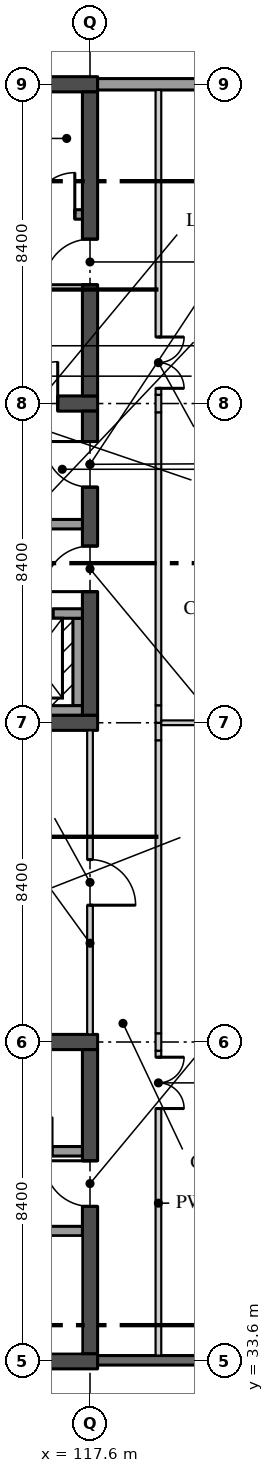
"""IFC4 building model, lengths in metres.
Left out: names, types, materials, properties, quantities, classifications, styles, units other than length and angle.
Written with IfcOpenShell. Run it as: python <this file> out.ifc"""

import sys

from ifc_helpers import new_model, si_unit, direction, frame, frame_2d, origin, place, context, subcontext, project, spatial, rectangle, extrude, element, fill, save


model = new_model("IFC4")
c1 = context("Model", 3, precision=1e-05, world=origin(), true_north=direction((0.0, 1.0)))
c2 = subcontext(c1, "Body", "Model", "MODEL_VIEW")
j1 = project(units=[si_unit("LENGTHUNIT", "METRE"), si_unit("PLANEANGLEUNIT", "RADIAN")], contexts=[c1])
p1 = place(None, origin())
s1 = spatial("IfcSite", under=j1, at=p1, CompositionType="ELEMENT")
p2 = place(p1, origin())
s2 = spatial("IfcBuilding", under=s1, at=p2, CompositionType="ELEMENT")
p3 = place(p2, frame((0.0, 0.0, 14.4)))
s3 = spatial("IfcBuildingStorey", under=s2, at=p3, CompositionType="ELEMENT", Elevation=14.4)
p4 = place(p3, frame((109.0, 50.4, 0.0), z_axis=(0.0, 0.0, 1.0), x_axis=(1.0, 0.0, 0.0)))
e1 = element("IfcWall", 1, at=p4, inside=s3, PredefinedType="SHEAR", context=c2, shape_type="SweptSolid", body=[
    extrude(rectangle(XDim=8.8, YDim=0.4, at=frame_2d((4.4, 0.0))), origin(), (0.0, 0.0, 1.0), 4.37),
])
p5 = place(p3, frame((109.0, 58.8, 0.0), z_axis=(0.0, 0.0, 1.0), x_axis=(1.0, 0.0, 0.0)))
e2 = element("IfcWall", 2, at=p5, inside=s3, PredefinedType="SHEAR", context=c2, shape_type="SweptSolid", body=[
    extrude(rectangle(XDim=8.8, YDim=0.4, at=frame_2d((4.4, 0.0))), origin(), (0.0, 0.0, 1.0), 4.37),
])
p6 = place(p5, frame((6.65, 0.0, 0.0)))
e3 = element("IfcOpeningElement", 3, at=p6, cuts=e2, PredefinedType="OPENING", context=c2, shape_type="SweptSolid", body=[
    extrude(rectangle(XDim=1.1, YDim=2.1, at=frame_2d((0.55, 1.05))), frame((0.0, 0.21, 0.0), z_axis=(0.0, -1.0, 0.0), x_axis=(1.0, 0.0, 0.0)), (0.0, 0.0, 1.0), 0.42),
])
p7 = place(p3, frame((117.6, 50.6, 0.0), z_axis=(0.0, 0.0, 1.0), x_axis=(0.0, 1.0, 0.0)))
e4 = element("IfcWall", 4, at=p7, inside=s3, PredefinedType="SHEAR", context=c2, shape_type="SweptSolid", body=[
    extrude(rectangle(XDim=8.0, YDim=0.4, at=frame_2d((4.0, 0.0))), origin(), (0.0, 0.0, 1.0), 4.37),
])
p8 = place(p7, frame((3.25, 0.0, 0.0)))
e5 = element("IfcOpeningElement", 5, at=p8, cuts=e4, PredefinedType="OPENING", context=c2, shape_type="SweptSolid", body=[
    extrude(rectangle(XDim=1.2, YDim=2.1, at=frame_2d((0.6, 1.05))), frame((0.0, 0.21, 0.0), z_axis=(0.0, -1.0, 0.0), x_axis=(1.0, 0.0, 0.0)), (0.0, 0.0, 1.0), 0.42),
])
p9 = place(p7, frame((6.0, 0.0, 0.0)))
e6 = element("IfcOpeningElement", 6, at=p9, cuts=e4, PredefinedType="OPENING", context=c2, shape_type="SweptSolid", body=[
    extrude(rectangle(XDim=1.2, YDim=2.1, at=frame_2d((0.6, 1.05))), frame((0.0, 0.21, 0.0), z_axis=(0.0, -1.0, 0.0), x_axis=(1.0, 0.0, 0.0)), (0.0, 0.0, 1.0), 0.42),
])
p10 = place(p3, frame((114.75, 55.625, 0.0), z_axis=(0.0, 0.0, 1.0), x_axis=(1.0, 0.0, 0.0)))
e7 = element("IfcWall", 7, at=p10, inside=s3, PredefinedType="SOLIDWALL", context=c2, shape_type="SweptSolid", body=[
    extrude(rectangle(XDim=2.65, YDim=0.25, at=frame_2d((1.325, 0.0))), origin(), (0.0, 0.0, 1.0), 4.37),
])
p11 = place(p3, frame((109.0, 67.2, 0.0), z_axis=(0.0, 0.0, 1.0), x_axis=(1.0, 0.0, 0.0)))
e8 = element("IfcWall", 8, at=p11, inside=s3, PredefinedType="SHEAR", context=c2, shape_type="SweptSolid", body=[
    extrude(rectangle(XDim=8.8, YDim=0.4, at=frame_2d((4.4, 0.0))), origin(), (0.0, 0.0, 1.0), 4.37),
])
p12 = place(p3, frame((117.6, 59.0, 0.0), z_axis=(0.0, 0.0, 1.0), x_axis=(0.0, 1.0, 0.0)))
e9 = element("IfcWall", 9, at=p12, inside=s3, PredefinedType="SHEAR", context=c2, shape_type="SweptSolid", body=[
    extrude(rectangle(XDim=8.0, YDim=0.4, at=frame_2d((4.0, 0.0))), origin(), (0.0, 0.0, 1.0), 4.37),
])
p13 = place(p12, frame((2.925, 0.0, 0.0)))
e10 = element("IfcOpeningElement", 10, at=p13, cuts=e9, PredefinedType="OPENING", context=c2, shape_type="SweptSolid", body=[
    extrude(rectangle(XDim=1.2, YDim=2.1, at=frame_2d((0.6, 1.05))), frame((0.0, 0.21, 0.0), z_axis=(0.0, -1.0, 0.0), x_axis=(1.0, 0.0, 0.0)), (0.0, 0.0, 1.0), 0.42),
])
p14 = place(p3, frame((117.4, 63.775, 0.0), z_axis=(0.0, 0.0, 1.0), x_axis=(-1.0, 0.0, 0.0)))
e11 = element("IfcWall", 11, at=p14, inside=s3, PredefinedType="SOLIDWALL", context=c2, shape_type="SweptSolid", body=[
    extrude(rectangle(XDim=8.0, YDim=0.25, at=frame_2d((4.0, 0.0))), origin(), (0.0, 0.0, 1.0), 4.37),
])
p15 = place(p14, frame((0.2, 0.0, 0.0)))
e12 = element("IfcOpeningElement", 12, at=p15, cuts=e11, PredefinedType="OPENING", context=c2, shape_type="SweptSolid", body=[
    extrude(rectangle(XDim=1.1, YDim=2.1, at=frame_2d((0.55, 1.05))), frame((0.0, 0.135, 0.0), z_axis=(0.0, -1.0, 0.0), x_axis=(1.0, 0.0, 0.0)), (0.0, 0.0, 1.0), 0.27),
])
for number, where, z_axis, x_axis in (
    (13, (109.0, 33.6, 0.0), (0.0, 0.0, 1.0), (1.0, 0.0, 0.0)),
    (14, (109.0, 42.0, 0.0), (0.0, 0.0, 1.0), (1.0, 0.0, 0.0)),
):
    element("IfcWall", number, at=place(p3, frame(where, z_axis=z_axis, x_axis=x_axis)), inside=s3, PredefinedType="SHEAR", context=c2, shape_type="SweptSolid", body=[
        extrude(rectangle(XDim=8.8, YDim=0.4, at=frame_2d((4.4, 0.0))), origin(), (0.0, 0.0, 1.0), 4.37),
    ])
p16 = place(p3, frame((117.6, 33.8, 0.0), z_axis=(0.0, 0.0, 1.0), x_axis=(0.0, 1.0, 0.0)))
e15 = element("IfcWall", 15, at=p16, inside=s3, PredefinedType="SHEAR", context=c2, shape_type="SweptSolid", body=[
    extrude(rectangle(XDim=8.0, YDim=0.4, at=frame_2d((4.0, 0.0))), origin(), (0.0, 0.0, 1.0), 4.37),
])
p17 = place(p16, frame((3.875, 0.0, 0.0)))
e16 = element("IfcOpeningElement", 16, at=p17, cuts=e15, PredefinedType="OPENING", context=c2, shape_type="SweptSolid", body=[
    extrude(rectangle(XDim=1.2, YDim=2.1, at=frame_2d((0.6, 1.05))), frame((0.0, 0.21, 0.0), z_axis=(0.0, -1.0, 0.0), x_axis=(1.0, 0.0, 0.0)), (0.0, 0.0, 1.0), 0.42),
])
p18 = place(p3, frame((109.4, 37.025, 0.0), z_axis=(0.0, 0.0, 1.0), x_axis=(1.0, 0.0, 0.0)))
e17 = element("IfcWall", 17, at=p18, inside=s3, PredefinedType="SOLIDWALL", context=c2, shape_type="SweptSolid", body=[
    extrude(rectangle(XDim=8.0, YDim=0.25, at=frame_2d((4.0, 0.0))), origin(), (0.0, 0.0, 1.0), 4.37),
])
p19 = place(p18, frame((0.2, 0.0, 0.0)))
e18 = element("IfcOpeningElement", 18, at=p19, cuts=e17, PredefinedType="OPENING", context=c2, shape_type="SweptSolid", body=[
    extrude(rectangle(XDim=1.1, YDim=2.1, at=frame_2d((0.55, 1.05))), frame((0.0, 0.135, 0.0), z_axis=(0.0, -1.0, 0.0), x_axis=(1.0, 0.0, 0.0)), (0.0, 0.0, 1.0), 0.27),
])
p20 = place(p3, frame((112.05, 39.125, 0.0), z_axis=(0.0, 0.0, 1.0), x_axis=(1.0, 0.0, 0.0)))
e19 = element("IfcWall", 19, at=p20, inside=s3, PredefinedType="SOLIDWALL", context=c2, shape_type="SweptSolid", body=[
    extrude(rectangle(XDim=5.35, YDim=0.25, at=frame_2d((2.675, 0.0))), origin(), (0.0, 0.0, 1.0), 4.37),
])
p21 = place(p20, frame((3.65, 0.0, 0.0)))
e20 = element("IfcOpeningElement", 20, at=p21, cuts=e19, PredefinedType="OPENING", context=c2, shape_type="SweptSolid", body=[
    extrude(rectangle(XDim=0.9, YDim=2.1, at=frame_2d((0.45, 1.05))), frame((0.0, 0.135, 0.0), z_axis=(0.0, -1.0, 0.0), x_axis=(1.0, 0.0, 0.0)), (0.0, 0.0, 1.0), 0.27),
])
p22 = place(p20, frame((0.9, 0.0, 0.0)))
e21 = element("IfcOpeningElement", 21, at=p22, cuts=e19, PredefinedType="OPENING", context=c2, shape_type="SweptSolid", body=[
    extrude(rectangle(XDim=0.8, YDim=2.1, at=frame_2d((0.4, 1.05))), frame((0.0, 0.135, 0.0), z_axis=(0.0, -1.0, 0.0), x_axis=(1.0, 0.0, 0.0)), (0.0, 0.0, 1.0), 0.27),
])
p23 = place(p3, frame((117.275, 50.85, 0.0), z_axis=(0.0, 0.0, 1.0), x_axis=(0.0, 1.0, 0.0)))
e22 = element("IfcWall", 22, at=p23, inside=s3, PredefinedType="SOLIDWALL", context=c2, shape_type="SweptSolid", body=[
    extrude(rectangle(XDim=2.3, YDim=0.25, at=frame_2d((1.15, 0.0))), origin(), (0.0, 0.0, 1.0), 4.37),
])
p24 = place(p3, frame((114.75, 53.275, 0.0), z_axis=(0.0, 0.0, 1.0), x_axis=(1.0, 0.0, 0.0)))
e23 = element("IfcWall", 23, at=p24, inside=s3, PredefinedType="SOLIDWALL", context=c2, shape_type="SweptSolid", body=[
    extrude(rectangle(XDim=2.65, YDim=0.25, at=frame_2d((1.325, 0.0))), origin(), (0.0, 0.0, 1.0), 4.37),
])
p25 = place(p24, frame((0.775, 0.0, 0.0)))
e24 = element("IfcOpeningElement", 24, at=p25, cuts=e23, PredefinedType="OPENING", context=c2, shape_type="SweptSolid", body=[
    extrude(rectangle(XDim=1.1, YDim=2.1, at=frame_2d((0.55, 1.05))), frame((0.0, 0.135, 0.0), z_axis=(0.0, -1.0, 0.0), x_axis=(1.0, 0.0, 0.0)), (0.0, 0.0, 1.0), 0.27),
])
p26 = place(p3, frame((114.75, 50.725, 0.0), z_axis=(0.0, 0.0, 1.0), x_axis=(1.0, 0.0, 0.0)))
e25 = element("IfcWall", 25, at=p26, inside=s3, PredefinedType="SOLIDWALL", context=c2, shape_type="SweptSolid", body=[
    extrude(rectangle(XDim=2.65, YDim=0.25, at=frame_2d((1.325, 0.0))), origin(), (0.0, 0.0, 1.0), 4.37),
])
p27 = place(p3, frame((119.4, 33.75, 0.0), z_axis=(0.0, 0.0, 1.0), x_axis=(0.0, 1.0, 0.0)))
e26 = element("IfcWall", 26, at=p27, inside=s3, PredefinedType="PARTITIONING", context=c2, shape_type="SweptSolid", body=[
    extrude(rectangle(XDim=8.02, YDim=0.15, at=frame_2d((4.01, 0.0))), origin(), (0.0, 0.0, 1.0), 4.37),
])
p28 = place(p27, frame((6.5, 0.0, 0.0)))
e27 = element("IfcOpeningElement", 27, at=p28, cuts=e26, PredefinedType="OPENING", context=c2, shape_type="SweptSolid", body=[
    extrude(rectangle(XDim=1.35, YDim=2.1, at=frame_2d((0.675, 1.05))), frame((0.0, 0.085, 0.0), z_axis=(0.0, -1.0, 0.0), x_axis=(1.0, 0.0, 0.0)), (0.0, 0.0, 1.0), 0.17),
])
p29 = place(p3, frame((119.4, 41.77, 0.0), z_axis=(0.0, 0.0, 1.0), x_axis=(0.0, 1.0, 0.0)))
e28 = element("IfcWall", 28, at=p29, inside=s3, PredefinedType="PARTITIONING", context=c2, shape_type="SweptSolid", body=[
    extrude(rectangle(XDim=0.46, YDim=0.15, at=frame_2d((0.23, 0.0))), origin(), (0.0, 0.0, 1.0), 3.746),
])
p30 = place(p3, frame((119.4, 42.23, 0.0), z_axis=(0.0, 0.0, 1.0), x_axis=(0.0, 1.0, 0.0)))
e29 = element("IfcWall", 29, at=p30, inside=s3, PredefinedType="PARTITIONING", context=c2, shape_type="SweptSolid", body=[
    extrude(rectangle(XDim=7.71, YDim=0.15, at=frame_2d((3.855, 0.0))), origin(), (0.0, 0.0, 1.0), 4.37),
])
p31 = place(p3, frame((119.4, 49.94, 0.0), z_axis=(0.0, 0.0, 1.0), x_axis=(0.0, 1.0, 0.0)))
e30 = element("IfcWall", 30, at=p31, inside=s3, PredefinedType="PARTITIONING", context=c2, shape_type="SweptSolid", body=[
    extrude(rectangle(XDim=0.46, YDim=0.15, at=frame_2d((0.23, 0.0))), origin(), (0.0, 0.0, 1.0), 3.746),
])
p32 = place(p3, frame((119.4, 50.4, 0.0), z_axis=(0.0, 0.0, 1.0), x_axis=(0.0, 1.0, 0.0)))
e31 = element("IfcWall", 31, at=p32, inside=s3, PredefinedType="PARTITIONING", context=c2, shape_type="SweptSolid", body=[
    extrude(rectangle(XDim=0.46, YDim=0.15, at=frame_2d((0.23, 0.0))), origin(), (0.0, 0.0, 1.0), 3.746),
])
p33 = place(p3, frame((119.4, 50.86, 0.0), z_axis=(0.0, 0.0, 1.0), x_axis=(0.0, 1.0, 0.0)))
e32 = element("IfcWall", 32, at=p33, inside=s3, PredefinedType="PARTITIONING", context=c2, shape_type="SweptSolid", body=[
    extrude(rectangle(XDim=7.71, YDim=0.15, at=frame_2d((3.855, 0.0))), origin(), (0.0, 0.0, 1.0), 4.37),
])
p34 = place(p3, frame((119.4, 58.57, 0.0), z_axis=(0.0, 0.0, 1.0), x_axis=(0.0, 1.0, 0.0)))
e33 = element("IfcWall", 33, at=p34, inside=s3, PredefinedType="PARTITIONING", context=c2, shape_type="SweptSolid", body=[
    extrude(rectangle(XDim=0.46, YDim=0.15, at=frame_2d((0.23, 0.0))), origin(), (0.0, 0.0, 1.0), 3.746),
])
p35 = place(p3, frame((119.4, 59.03, 0.0), z_axis=(0.0, 0.0, 1.0), x_axis=(0.0, 1.0, 0.0)))
e34 = element("IfcWall", 34, at=p35, inside=s3, PredefinedType="PARTITIONING", context=c2, shape_type="SweptSolid", body=[
    extrude(rectangle(XDim=8.02, YDim=0.15, at=frame_2d((4.01, 0.0))), origin(), (0.0, 0.0, 1.0), 4.37),
])
p36 = place(p35, frame((0.17, 0.0, 0.0)))
e35 = element("IfcOpeningElement", 35, at=p36, cuts=e34, PredefinedType="OPENING", context=c2, shape_type="SweptSolid", body=[
    extrude(rectangle(XDim=1.35, YDim=2.1, at=frame_2d((0.675, 1.05))), frame((0.0, 0.085, 0.0), z_axis=(0.0, -1.0, 0.0), x_axis=(1.0, 0.0, 0.0)), (0.0, 0.0, 1.0), 0.17),
])
p37 = place(p3, frame((117.6, 42.2, 0.0), z_axis=(0.0, 0.0, 1.0), x_axis=(0.0, 1.0, 0.0)))
e36 = element("IfcWall", 36, at=p37, inside=s3, PredefinedType="PARTITIONING", context=c2, shape_type="SweptSolid", body=[
    extrude(rectangle(XDim=8.0, YDim=0.15, at=frame_2d((4.0, 0.0))), origin(), (0.0, 0.0, 1.0), 3.746),
])
p38 = place(p37, frame((3.4, 0.0, 0.0)))
e37 = element("IfcOpeningElement", 37, at=p38, cuts=e36, PredefinedType="OPENING", context=c2, shape_type="SweptSolid", body=[
    extrude(rectangle(XDim=1.2, YDim=2.4, at=frame_2d((0.6, 1.2))), frame((0.0, 0.085, 0.0), z_axis=(0.0, -1.0, 0.0), x_axis=(1.0, 0.0, 0.0)), (0.0, 0.0, 1.0), 0.17),
])
p39 = place(p3, frame((119.475, 50.4, 0.0), z_axis=(0.0, 0.0, 1.0), x_axis=(1.0, 0.0, 0.0)))
e38 = element("IfcWall", 38, at=p39, inside=s3, PredefinedType="PARTITIONING", context=c2, shape_type="SweptSolid", body=[
    extrude(rectangle(XDim=6.327, YDim=0.125, at=frame_2d((3.164, 0.0))), origin(), (0.0, 0.0, 1.0), 3.746),
])
p40 = place(p3, frame((117.8, 33.625, 0.0), z_axis=(0.0, 0.0, 1.0), x_axis=(1.0, 0.0, 0.0)))
e39 = element("IfcWall", 39, at=p40, inside=s3, PredefinedType="SOLIDWALL", context=c2, shape_type="SweptSolid", body=[
    extrude(rectangle(XDim=8.195, YDim=0.25, at=frame_2d((4.098, 0.0))), origin(), (0.0, 0.0, 1.0), 3.746),
])
p41 = place(p40, frame((5.2, 0.0, 0.9)))
e40 = element("IfcOpeningElement", 40, at=p41, cuts=e39, PredefinedType="OPENING", context=c2, shape_type="SweptSolid", body=[
    extrude(rectangle(XDim=1.8, YDim=2.1, at=frame_2d((0.9, 1.05))), frame((0.0, 0.135, 0.0), z_axis=(0.0, -1.0, 0.0), x_axis=(1.0, 0.0, 0.0)), (0.0, 0.0, 1.0), 0.27),
])
p42 = place(p3, frame((125.998, 67.2, 0.0), z_axis=(0.0, 0.0, 1.0), x_axis=(-1.0, 0.0, 0.0)))
e41 = element("IfcWall", 41, at=p42, inside=s3, PredefinedType="SOLIDWALL", context=c2, shape_type="SweptSolid", body=[
    extrude(rectangle(XDim=8.198, YDim=0.3, at=frame_2d((4.099, 0.0))), origin(), (0.0, 0.0, 1.0), 3.746),
])
p43 = place(p8, origin())
e42 = element("IfcDoor", 42, at=p43, inside=s3, OperationType="SINGLE_SWING_RIGHT", PredefinedType="DOOR", context=c2, shape_type="SweptSolid", body=[
    extrude(rectangle(XDim=1.2, YDim=2.1, at=frame_2d((0.6, 1.05))), frame((0.0, 0.035, 0.0), z_axis=(0.0, -1.0, 0.0), x_axis=(1.0, 0.0, 0.0)), (0.0, 0.0, 1.0), 0.07),
])
fill(e5, e42)
p44 = place(p9, origin())
e43 = element("IfcDoor", 43, at=p44, inside=s3, OperationType="SINGLE_SWING_LEFT", PredefinedType="DOOR", context=c2, shape_type="SweptSolid", body=[
    extrude(rectangle(XDim=1.2, YDim=2.1, at=frame_2d((0.6, 1.05))), frame((0.0, 0.035, 0.0), z_axis=(0.0, -1.0, 0.0), x_axis=(1.0, 0.0, 0.0)), (0.0, 0.0, 1.0), 0.07),
])
fill(e6, e43)
p45 = place(p6, origin())
e44 = element("IfcDoor", 44, at=p45, inside=s3, OperationType="SINGLE_SWING_LEFT", PredefinedType="DOOR", context=c2, shape_type="SweptSolid", body=[
    extrude(rectangle(XDim=1.1, YDim=2.1, at=frame_2d((0.55, 1.05))), frame((0.0, 0.035, 0.0), z_axis=(0.0, -1.0, 0.0), x_axis=(1.0, 0.0, 0.0)), (0.0, 0.0, 1.0), 0.07),
])
fill(e3, e44)
p46 = place(p13, origin())
e45 = element("IfcDoor", 45, at=p46, inside=s3, OperationType="SINGLE_SWING_RIGHT", PredefinedType="DOOR", context=c2, shape_type="SweptSolid", body=[
    extrude(rectangle(XDim=1.2, YDim=2.1, at=frame_2d((0.6, 1.05))), frame((0.0, 0.035, 0.0), z_axis=(0.0, -1.0, 0.0), x_axis=(1.0, 0.0, 0.0)), (0.0, 0.0, 1.0), 0.07),
])
fill(e10, e45)
p47 = place(p15, frame((1.1, 0.0, 0.0), z_axis=(0.0, 0.0, 1.0), x_axis=(-1.0, 0.0, 0.0)))
e46 = element("IfcDoor", 46, at=p47, inside=s3, OperationType="SINGLE_SWING_LEFT", PredefinedType="DOOR", context=c2, shape_type="SweptSolid", body=[
    extrude(rectangle(XDim=1.1, YDim=2.1, at=frame_2d((0.55, 1.05))), frame((0.0, 0.035, 0.0), z_axis=(0.0, -1.0, 0.0), x_axis=(1.0, 0.0, 0.0)), (0.0, 0.0, 1.0), 0.07),
])
fill(e12, e46)
p48 = place(p17, origin())
e47 = element("IfcDoor", 47, at=p48, inside=s3, OperationType="SINGLE_SWING_LEFT", PredefinedType="DOOR", context=c2, shape_type="SweptSolid", body=[
    extrude(rectangle(XDim=1.2, YDim=2.1, at=frame_2d((0.6, 1.05))), frame((0.0, 0.035, 0.0), z_axis=(0.0, -1.0, 0.0), x_axis=(1.0, 0.0, 0.0)), (0.0, 0.0, 1.0), 0.07),
])
fill(e16, e47)
p49 = place(p25, origin())
e48 = element("IfcDoor", 48, at=p49, inside=s3, OperationType="DOUBLE_DOOR_SLIDING", PredefinedType="DOOR", context=c2, shape_type="SweptSolid", body=[
    extrude(rectangle(XDim=1.1, YDim=2.1, at=frame_2d((0.55, 1.05))), frame((0.0, 0.04, 0.0), z_axis=(0.0, -1.0, 0.0), x_axis=(1.0, 0.0, 0.0)), (0.0, 0.0, 1.0), 0.08),
])
fill(e24, e48)
p50 = place(p28, frame((1.35, 0.0, 0.0), z_axis=(0.0, 0.0, 1.0), x_axis=(-1.0, 0.0, 0.0)))
e49 = element("IfcDoor", 49, at=p50, inside=s3, OperationType="DOUBLE_DOOR_SINGLE_SWING", PredefinedType="DOOR", context=c2, shape_type="SweptSolid", body=[
    extrude(rectangle(XDim=1.35, YDim=2.1, at=frame_2d((0.675, 1.05))), frame((0.0, 0.025, 0.0), z_axis=(0.0, -1.0, 0.0), x_axis=(1.0, 0.0, 0.0)), (0.0, 0.0, 1.0), 0.05),
])
fill(e27, e49)
p51 = place(p36, frame((1.35, 0.0, 0.0), z_axis=(0.0, 0.0, 1.0), x_axis=(-1.0, 0.0, 0.0)))
e50 = element("IfcDoor", 50, at=p51, inside=s3, OperationType="DOUBLE_DOOR_SINGLE_SWING", PredefinedType="DOOR", context=c2, shape_type="SweptSolid", body=[
    extrude(rectangle(XDim=1.35, YDim=2.1, at=frame_2d((0.675, 1.05))), frame((0.0, 0.025, 0.0), z_axis=(0.0, -1.0, 0.0), x_axis=(1.0, 0.0, 0.0)), (0.0, 0.0, 1.0), 0.05),
])
fill(e35, e50)
p52 = place(p38, frame((1.2, 0.0, 0.0), z_axis=(0.0, 0.0, 1.0), x_axis=(-1.0, 0.0, 0.0)))
e51 = element("IfcDoor", 51, at=p52, inside=s3, OperationType="SINGLE_SWING_LEFT", PredefinedType="DOOR", context=c2, shape_type="SweptSolid", body=[
    extrude(rectangle(XDim=1.2, YDim=2.4, at=frame_2d((0.6, 1.2))), frame((0.0, 0.025, 0.0), z_axis=(0.0, -1.0, 0.0), x_axis=(1.0, 0.0, 0.0)), (0.0, 0.0, 1.0), 0.05),
])
fill(e37, e51)
save(model, sys.argv[1])
